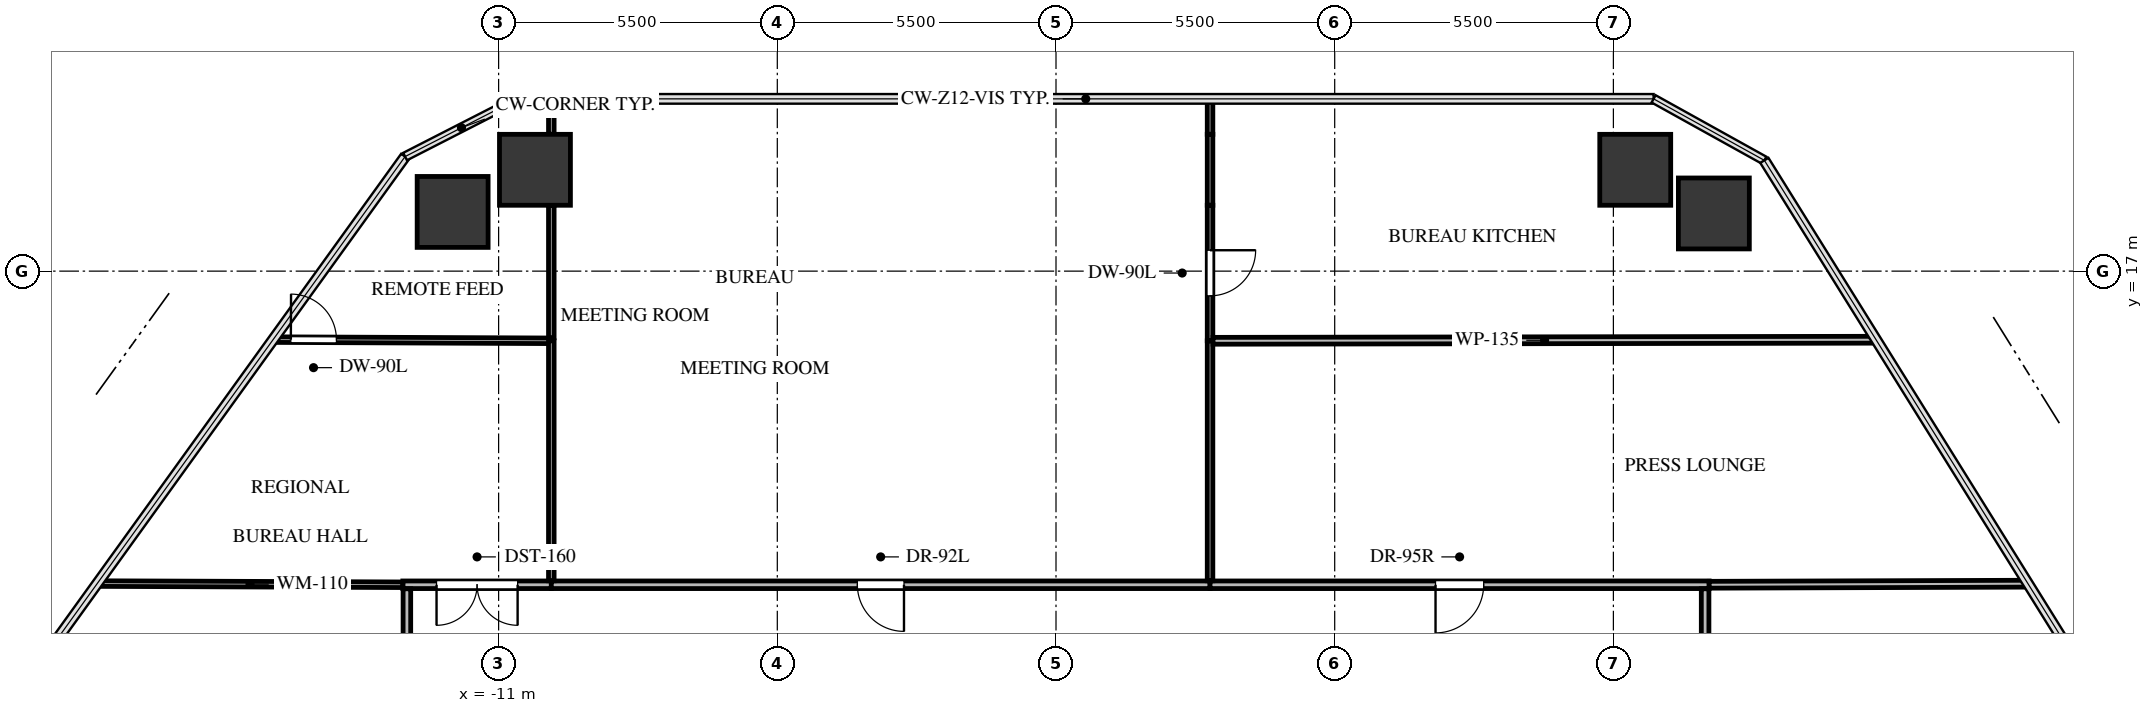
"""IFC4 building model, lengths in metres.
Left out: names, types, materials, properties, quantities, classifications, styles, units other than length and angle.
Written with IfcOpenShell. Run it as: python <this file> out.ifc"""

import sys

from ifc_helpers import new_model, si_unit, direction, frame, frame_2d, origin, origin_2d, place, context, subcontext, project, spatial, rectangle, extrude, source, transform, mapped, element, fill, save


model = new_model("IFC4")
c1 = context("Model", 3, precision=1e-05, world=origin(), true_north=direction((0.0, 1.0)))
c2 = subcontext(c1, "Body", "Model", "MODEL_VIEW")
j1 = project(units=[si_unit("LENGTHUNIT", "METRE"), si_unit("PLANEANGLEUNIT", "RADIAN")], contexts=[c1])
p1 = place(None, origin())
s1 = spatial("IfcSite", under=j1, at=p1, CompositionType="ELEMENT")
p2 = place(p1, origin())
s2 = spatial("IfcBuilding", under=s1, at=p2, CompositionType="ELEMENT")
p3 = place(p2, frame((0.0, 0.0, 84.3)))
s3 = spatial("IfcBuildingStorey", under=s2, at=p3, CompositionType="ELEMENT", Elevation=84.3)
m1 = source(origin(), c2, "Body", "SweptSolid", [
    extrude(rectangle(XDim=1.4, YDim=1.4, at=origin_2d()), origin(), (0.0, 0.0, 1.0), 4.14),
])
for number, where, z_axis, x_axis in (
    (1, (-11.907, 18.168, -0.24), (0.0, 0.0, 1.0), (1.0, 0.0, 0.0)),
    (2, (-10.283, 19.0, -0.24), (0.0, 0.0, 1.0), (1.0, 0.0, 0.0)),
    (3, (11.431, 19.0, -0.24), (0.0, 0.0, 1.0), (1.0, 0.0, 0.0)),
    (4, (12.983, 18.138, -0.24), (0.0, 0.0, 1.0), (1.0, 0.0, 0.0)),
):
    element("IfcColumn", number, at=place(p3, frame(where, z_axis=z_axis, x_axis=x_axis)), inside=s3, PredefinedType="COLUMN", context=c2, shape_type="MappedRepresentation", body=[
        mapped(m1, transform((0.0, 0.0, 0.0), x_axis=(1.0, 0.0, 0.0), y_axis=(0.0, 1.0, 0.0), z_axis=(0.0, 0.0, 1.0), scale=1.0)),
    ])
p4 = place(p3, frame((-9.96, 10.81, 0.0), z_axis=(0.0, 0.0, 1.0), x_axis=(-1.0, 0.0, 0.0)))
e5 = element("IfcWall", 5, at=p4, inside=s3, PredefinedType="PARTITIONING", context=c2, shape_type="SweptSolid", body=[
    extrude(rectangle(XDim=2.93, YDim=0.15, at=frame_2d((1.465, 0.0))), origin(), (0.0, 0.0, 1.0), 3.885),
])
p5 = place(p4, frame((0.665, 0.0, 0.0)))
e6 = element("IfcOpeningElement", 6, at=p5, cuts=e5, PredefinedType="OPENING", context=c2, shape_type="SweptSolid", body=[
    extrude(rectangle(XDim=1.6, YDim=2.15, at=frame_2d((0.8, 1.075))), frame((0.0, 0.085, 0.0), z_axis=(0.0, -1.0, 0.0), x_axis=(1.0, 0.0, 0.0)), (0.0, 0.0, 1.0), 0.17),
])
p6 = place(p3, frame((3.04, 10.81, 0.0), z_axis=(0.0, 0.0, 1.0), x_axis=(-1.0, 0.0, 0.0)))
e7 = element("IfcWall", 7, at=p6, inside=s3, PredefinedType="PARTITIONING", context=c2, shape_type="SweptSolid", body=[
    extrude(rectangle(XDim=13.0, YDim=0.15, at=frame_2d((6.5, 0.0))), origin(), (0.0, 0.0, 1.0), 2.32),
])
p7 = place(p6, frame((6.04, 0.0, 0.0)))
e8 = element("IfcOpeningElement", 8, at=p7, cuts=e7, PredefinedType="OPENING", context=c2, shape_type="SweptSolid", body=[
    extrude(rectangle(XDim=0.92, YDim=2.1, at=frame_2d((0.46, 1.05))), frame((0.0, 0.085, 0.0), z_axis=(0.0, -1.0, 0.0), x_axis=(1.0, 0.0, 0.0)), (0.0, 0.0, 1.0), 0.17),
])
p8 = place(p3, frame((12.89, 10.81, 0.0), z_axis=(0.0, 0.0, 1.0), x_axis=(-1.0, 0.0, 0.0)))
e9 = element("IfcWall", 9, at=p8, inside=s3, PredefinedType="PARTITIONING", context=c2, shape_type="SweptSolid", body=[
    extrude(rectangle(XDim=9.85, YDim=0.15, at=frame_2d((4.925, 0.0))), origin(), (0.0, 0.0, 1.0), 2.32),
])
p9 = place(p8, frame((4.45, 0.0, 0.0)))
e10 = element("IfcOpeningElement", 10, at=p9, cuts=e9, PredefinedType="OPENING", context=c2, shape_type="SweptSolid", body=[
    extrude(rectangle(XDim=0.95, YDim=2.1, at=frame_2d((0.475, 1.05))), frame((0.0, 0.085, 0.0), z_axis=(0.0, -1.0, 0.0), x_axis=(1.0, 0.0, 0.0)), (0.0, 0.0, 1.0), 0.17),
])
p10 = place(p3, frame((-12.81, 10.731, 0.0), z_axis=(0.0, 0.0, 1.0), x_axis=(0.0, -1.0, 0.0)))
e11 = element("IfcWall", 11, at=p10, inside=s3, PredefinedType="PARTITIONING", context=c2, shape_type="SweptSolid", body=[
    extrude(rectangle(XDim=21.462, YDim=0.15, at=frame_2d((10.731, 0.0))), origin(), (0.0, 0.0, 1.0), 2.32),
])
p11 = place(p10, frame((10.271, 0.0, 0.0)))
e12 = element("IfcOpeningElement", 12, at=p11, cuts=e11, PredefinedType="OPENING", context=c2, shape_type="SweptSolid", body=[
    extrude(rectangle(XDim=0.92, YDim=2.1, at=frame_2d((0.46, 1.05))), frame((0.0, 0.085, 0.0), z_axis=(0.0, -1.0, 0.0), x_axis=(1.0, 0.0, 0.0)), (0.0, 0.0, 1.0), 0.17),
])
p12 = place(p3, frame((12.81, 2.49, 0.0), z_axis=(0.0, 0.0, 1.0), x_axis=(0.0, 1.0, 0.0)))
e13 = element("IfcWall", 13, at=p12, inside=s3, PredefinedType="PARTITIONING", context=c2, shape_type="SweptSolid", body=[
    extrude(rectangle(XDim=8.241, YDim=0.15, at=frame_2d((4.121, 0.0))), origin(), (0.0, 0.0, 1.0), 3.885),
])
p13 = place(p12, frame((3.646, 0.0, 0.0)))
e14 = element("IfcOpeningElement", 14, at=p13, cuts=e13, PredefinedType="OPENING", context=c2, shape_type="SweptSolid", body=[
    extrude(rectangle(XDim=0.95, YDim=2.1, at=frame_2d((0.475, 1.05))), frame((0.0, 0.085, 0.0), z_axis=(0.0, -1.0, 0.0), x_axis=(1.0, 0.0, 0.0)), (0.0, 0.0, 1.0), 0.17),
])
p14 = place(p3, frame((-15.45, 15.648, 0.0), z_axis=(0.0, 0.0, 1.0), x_axis=(0.999990888186, -0.004268904539, 0.0)))
e15 = element("IfcWall", 15, at=p14, inside=s3, PredefinedType="MOVABLE", context=c2, shape_type="SweptSolid", body=[
    extrude(rectangle(XDim=5.49, YDim=0.11, at=frame_2d((2.745, 0.0))), origin(), (0.0, 0.0, 1.0), 2.32),
])
p15 = place(p14, frame((0.35, 0.0, 0.0)))
e16 = element("IfcOpeningElement", 16, at=p15, cuts=e15, PredefinedType="OPENING", context=c2, shape_type="SweptSolid", body=[
    extrude(rectangle(XDim=0.9, YDim=2.05, at=frame_2d((0.45, 1.025))), frame((0.0, 0.065, 0.0), z_axis=(0.0, -1.0, 0.0), x_axis=(1.0, 0.0, 0.0)), (0.0, 0.0, 1.0), 0.13),
])
p16 = place(p3, frame((-9.96, 15.625, 0.0), z_axis=(0.0, 0.0, 1.0), x_axis=(0.0, -1.0, 0.0)))
e17 = element("IfcWall", 17, at=p16, inside=s3, PredefinedType="MOVABLE", context=c2, shape_type="SweptSolid", body=[
    extrude(rectangle(XDim=4.736, YDim=0.11, at=frame_2d((2.368, 0.0))), origin(), (0.0, 0.0, 1.0), 3.885),
])
p17 = place(p3, frame((-12.89, 10.81, 0.0), z_axis=(0.0, 0.0, 1.0), x_axis=(-0.999992607823, 0.003845035728, 0.0)))
e18 = element("IfcWall", 18, at=p17, inside=s3, PredefinedType="MOVABLE", context=c2, shape_type="SweptSolid", body=[
    extrude(rectangle(XDim=6.032, YDim=0.11, at=frame_2d((3.016, 0.0))), origin(), (0.0, 0.0, 1.0), 2.32),
])
p18 = place(p3, frame((-9.96, 20.4, 0.0), z_axis=(0.0, 0.0, 1.0), x_axis=(0.0, -1.0, 0.0)))
e19 = element("IfcWall", 19, at=p18, inside=s3, PredefinedType="MOVABLE", context=c2, shape_type="SweptSolid", body=[
    extrude(rectangle(XDim=0.7, YDim=0.11, at=frame_2d((0.35, 0.0))), origin(), (0.0, 0.0, 1.0), 3.885),
])
p19 = place(p3, frame((-9.96, 18.3, 0.0), z_axis=(0.0, 0.0, 1.0), x_axis=(0.0, -1.0, 0.0)))
e20 = element("IfcWall", 20, at=p19, inside=s3, PredefinedType="MOVABLE", context=c2, shape_type="SweptSolid", body=[
    extrude(rectangle(XDim=2.616, YDim=0.11, at=frame_2d((1.308, 0.0))), origin(), (0.0, 0.0, 1.0), 3.885),
])
p20 = place(p3, frame((-9.96, 19.7, 0.0), z_axis=(0.0, 0.0, 1.0), x_axis=(0.0, -1.0, 0.0)))
e21 = element("IfcWall", 21, at=p20, inside=s3, PredefinedType="MOVABLE", context=c2, shape_type="SweptSolid", body=[
    extrude(rectangle(XDim=1.4, YDim=0.11, at=frame_2d((0.7, 0.0))), origin(), (0.0, 0.0, 1.0), 1.92),
])
p21 = place(p3, frame((3.04, 15.625, 0.0), z_axis=(0.0, 0.0, 1.0), x_axis=(0.0, -1.0, 0.0)))
e22 = element("IfcWall", 22, at=p21, inside=s3, PredefinedType="MOVABLE", context=c2, shape_type="SweptSolid", body=[
    extrude(rectangle(XDim=4.736, YDim=0.11, at=frame_2d((2.368, 0.0))), origin(), (0.0, 0.0, 1.0), 3.885),
])
p22 = place(p3, frame((3.04, 20.4, 0.0), z_axis=(0.0, 0.0, 1.0), x_axis=(0.0, -1.0, 0.0)))
e23 = element("IfcWall", 23, at=p22, inside=s3, PredefinedType="MOVABLE", context=c2, shape_type="SweptSolid", body=[
    extrude(rectangle(XDim=0.7, YDim=0.11, at=frame_2d((0.35, 0.0))), origin(), (0.0, 0.0, 1.0), 3.885),
])
p23 = place(p3, frame((3.04, 18.3, 0.0), z_axis=(0.0, 0.0, 1.0), x_axis=(0.0, -1.0, 0.0)))
e24 = element("IfcWall", 24, at=p23, inside=s3, PredefinedType="MOVABLE", context=c2, shape_type="SweptSolid", body=[
    extrude(rectangle(XDim=2.675, YDim=0.11, at=frame_2d((1.337, 0.0))), origin(), (0.0, 0.0, 1.0), 3.885),
])
p24 = place(p23, frame((0.887, 0.0, 0.0)))
e25 = element("IfcOpeningElement", 25, at=p24, cuts=e24, PredefinedType="OPENING", context=c2, shape_type="SweptSolid", body=[
    extrude(rectangle(XDim=0.9, YDim=2.05, at=frame_2d((0.45, 1.025))), frame((0.0, 0.065, 0.0), z_axis=(0.0, -1.0, 0.0), x_axis=(1.0, 0.0, 0.0)), (0.0, 0.0, 1.0), 0.13),
])
p25 = place(p3, frame((3.04, 19.7, 0.0), z_axis=(0.0, 0.0, 1.0), x_axis=(0.0, -1.0, 0.0)))
e26 = element("IfcWall", 26, at=p25, inside=s3, PredefinedType="MOVABLE", context=c2, shape_type="SweptSolid", body=[
    extrude(rectangle(XDim=1.4, YDim=0.11, at=frame_2d((0.7, 0.0))), origin(), (0.0, 0.0, 1.0), 1.92),
])
p26 = place(p3, frame((3.099, 15.625, 0.0), z_axis=(0.0, 0.0, 1.0), x_axis=(0.999998742354, 0.001585966846, 0.0)))
e27 = element("IfcWall", 27, at=p26, inside=s3, PredefinedType="PARTITIONING", context=c2, shape_type="SweptSolid", body=[
    extrude(rectangle(XDim=13.085, YDim=0.135, at=frame_2d((6.542, 0.0))), origin(), (0.0, 0.0, 1.0), 2.32),
])
p27 = place(p3, frame((19.182, 10.831, 0.0), z_axis=(0.0, 0.0, 1.0), x_axis=(-0.999994432845, -0.003336806783, 0.0)))
e28 = element("IfcWall", 28, at=p27, inside=s3, PredefinedType="PARTITIONING", context=c2, shape_type="SweptSolid", body=[
    extrude(rectangle(XDim=6.292, YDim=0.135, at=frame_2d((3.146, 0.0))), origin(), (0.0, 0.0, 1.0), 2.32),
])
m2 = source(origin(), c2, "Body", "SweptSolid", [
    extrude(rectangle(XDim=1.6, YDim=2.15, at=frame_2d((0.8, 1.075))), frame((0.0, 0.025, 0.0), z_axis=(0.0, -1.0, 0.0), x_axis=(1.0, 0.0, 0.0)), (0.0, 0.0, 1.0), 0.05),
])
p28 = place(p5, origin())
e29 = element("IfcDoor", 29, at=p28, inside=s3, OperationType="DOUBLE_DOOR_SINGLE_SWING", PredefinedType="DOOR", context=c2, shape_type="MappedRepresentation", body=[
    mapped(m2, transform((0.0, 0.0, 0.0), x_axis=(1.0, 0.0, 0.0), y_axis=(0.0, 1.0, 0.0), z_axis=(0.0, 0.0, 1.0), scale=1.0)),
])
fill(e6, e29)
m3 = source(origin(), c2, "Body", "SweptSolid", [
    extrude(rectangle(XDim=0.92, YDim=2.1, at=frame_2d((0.46, 1.05))), frame((0.0, 0.025, 0.0), z_axis=(0.0, -1.0, 0.0), x_axis=(1.0, 0.0, 0.0)), (0.0, 0.0, 1.0), 0.05),
])
p29 = place(p7, origin())
e30 = element("IfcDoor", 30, at=p29, inside=s3, OperationType="SINGLE_SWING_LEFT", PredefinedType="DOOR", context=c2, shape_type="MappedRepresentation", body=[
    mapped(m3, transform((0.0, 0.0, 0.0), x_axis=(1.0, 0.0, 0.0), y_axis=(0.0, 1.0, 0.0), z_axis=(0.0, 0.0, 1.0), scale=1.0)),
])
fill(e8, e30)
m4 = source(origin(), c2, "Body", "SweptSolid", [
    extrude(rectangle(XDim=0.95, YDim=2.1, at=frame_2d((0.475, 1.05))), frame((0.0, 0.025, 0.0), z_axis=(0.0, -1.0, 0.0), x_axis=(1.0, 0.0, 0.0)), (0.0, 0.0, 1.0), 0.05),
])
p30 = place(p9, origin())
e31 = element("IfcDoor", 31, at=p30, inside=s3, OperationType="SINGLE_SWING_RIGHT", PredefinedType="DOOR", context=c2, shape_type="MappedRepresentation", body=[
    mapped(m4, transform((0.0, 0.0, 0.0), x_axis=(1.0, 0.0, 0.0), y_axis=(0.0, 1.0, 0.0), z_axis=(0.0, 0.0, 1.0), scale=1.0)),
])
fill(e10, e31)
m5 = source(origin(), c2, "Body", "SweptSolid", [
    extrude(rectangle(XDim=0.9, YDim=2.05, at=frame_2d((0.45, 1.025))), frame((0.0, 0.025, 0.0), z_axis=(0.0, -1.0, 0.0), x_axis=(1.0, 0.0, 0.0)), (0.0, 0.0, 1.0), 0.05),
])
p31 = place(p15, origin())
e32 = element("IfcDoor", 32, at=p31, inside=s3, OperationType="SINGLE_SWING_LEFT", PredefinedType="DOOR", context=c2, shape_type="MappedRepresentation", body=[
    mapped(m5, transform((0.0, 0.0, 0.0), x_axis=(1.0, 0.0, 0.0), y_axis=(0.0, 1.0, 0.0), z_axis=(0.0, 0.0, 1.0), scale=1.0)),
])
fill(e16, e32)
p32 = place(p24, origin())
e33 = element("IfcDoor", 33, at=p32, inside=s3, OperationType="SINGLE_SWING_LEFT", PredefinedType="DOOR", context=c2, shape_type="MappedRepresentation", body=[
    mapped(m5, transform((0.0, 0.0, 0.0), x_axis=(1.0, 0.0, 0.0), y_axis=(0.0, 1.0, 0.0), z_axis=(0.0, 0.0, 1.0), scale=1.0)),
])
fill(e25, e33)
save(model, sys.argv[1])
